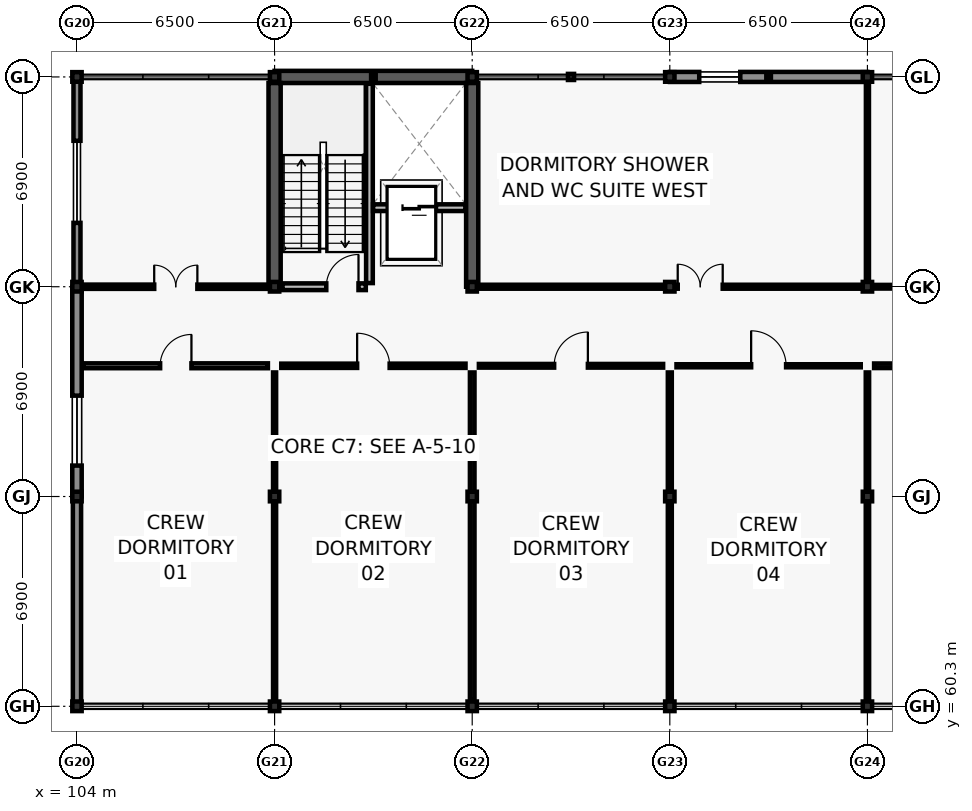
"""IFC4 building model, lengths in metres.
Left out: names, types, materials, properties, quantities, classifications, styles, units other than length and angle.
Written with IfcOpenShell. Run it as: python <this file> out.ifc"""

import sys

from ifc_helpers import new_model, si_unit, direction, frame, frame_2d, origin, origin_2d, place, context, subcontext, project, spatial, rectangle, hollow_rectangle, i_section, extrude, element, fill, save


model = new_model("IFC4")
c1 = context("Model", 3, precision=1e-05, world=origin(), true_north=direction((0.0, 1.0)))
c2 = subcontext(c1, "Body", "Model", "MODEL_VIEW")
j1 = project(units=[si_unit("LENGTHUNIT", "METRE"), si_unit("PLANEANGLEUNIT", "RADIAN")], contexts=[c1])
p1 = place(None, origin())
s1 = spatial("IfcSite", under=j1, at=p1, CompositionType="ELEMENT")
p2 = place(p1, origin())
s2 = spatial("IfcBuilding", under=s1, at=p2, CompositionType="ELEMENT")
p3 = place(p2, frame((0.0, 0.0, 9.6)))
s3 = spatial("IfcBuildingStorey", under=s2, at=p3, CompositionType="ELEMENT", Elevation=9.6)
for number, where, z_axis, x_axis in (
    (1, (104.0, 60.3, 0.0), (0.0, 0.0, 1.0), (1.0, 0.0, 0.0)),
    (2, (104.0, 67.2, 0.0), (0.0, 0.0, 1.0), (1.0, 0.0, 0.0)),
    (3, (104.0, 74.1, 0.0), (0.0, 0.0, 1.0), (1.0, 0.0, 0.0)),
    (4, (104.0, 81.0, 0.0), (0.0, 0.0, 1.0), (1.0, 0.0, 0.0)),
    (5, (110.5, 60.3, 0.0), (0.0, 0.0, 1.0), (1.0, 0.0, 0.0)),
    (6, (110.5, 67.2, 0.0), (0.0, 0.0, 1.0), (1.0, 0.0, 0.0)),
    (7, (110.5, 74.1, 0.0), (0.0, 0.0, 1.0), (1.0, 0.0, 0.0)),
    (8, (110.5, 81.0, 0.0), (0.0, 0.0, 1.0), (1.0, 0.0, 0.0)),
    (9, (117.0, 60.3, 0.0), (0.0, 0.0, 1.0), (1.0, 0.0, 0.0)),
    (10, (117.0, 67.2, 0.0), (0.0, 0.0, 1.0), (1.0, 0.0, 0.0)),
    (11, (117.0, 74.1, 0.0), (0.0, 0.0, 1.0), (1.0, 0.0, 0.0)),
    (12, (117.0, 81.0, 0.0), (0.0, 0.0, 1.0), (1.0, 0.0, 0.0)),
    (13, (123.5, 60.3, 0.0), (0.0, 0.0, 1.0), (1.0, 0.0, 0.0)),
    (14, (123.5, 67.2, 0.0), (0.0, 0.0, 1.0), (1.0, 0.0, 0.0)),
    (15, (123.5, 74.1, 0.0), (0.0, 0.0, 1.0), (1.0, 0.0, 0.0)),
    (16, (123.5, 81.0, 0.0), (0.0, 0.0, 1.0), (1.0, 0.0, 0.0)),
    (17, (130.0, 60.3, 0.0), (0.0, 0.0, 1.0), (1.0, 0.0, 0.0)),
    (18, (130.0, 67.2, 0.0), (0.0, 0.0, 1.0), (1.0, 0.0, 0.0)),
    (19, (130.0, 74.1, 0.0), (0.0, 0.0, 1.0), (1.0, 0.0, 0.0)),
    (20, (130.0, 81.0, 0.0), (0.0, 0.0, 1.0), (1.0, 0.0, 0.0)),
):
    element("IfcColumn", number, at=place(p3, frame(where, z_axis=z_axis, x_axis=x_axis)), inside=s3, PredefinedType="COLUMN", context=c2, shape_type="SweptSolid", body=[
        extrude(i_section(OverallWidth=0.307, OverallDepth=0.315, WebThickness=0.012, FlangeThickness=0.019, FilletRadius=0.017, at=origin_2d()), origin(), (0.0, 0.0, 1.0), 3.9),
    ])
p4 = place(p3, frame((113.75, 81.0, 0.0), z_axis=(0.0, 0.0, 1.0), x_axis=(1.0, 0.0, 0.0)))
e21 = element("IfcColumn", 21, at=p4, inside=s3, PredefinedType="PILASTER", context=c2, shape_type="SweptSolid", body=[
    extrude(hollow_rectangle(XDim=0.15, YDim=0.15, WallThickness=0.009, at=origin_2d()), origin(), (0.0, 0.0, 1.0), 3.9),
])
p5 = place(p3, frame((120.25, 81.0, 0.0), z_axis=(0.0, 0.0, 1.0), x_axis=(1.0, 0.0, 0.0)))
e22 = element("IfcColumn", 22, at=p5, inside=s3, PredefinedType="PILASTER", context=c2, shape_type="SweptSolid", body=[
    extrude(hollow_rectangle(XDim=0.2, YDim=0.2, WallThickness=0.01, at=origin_2d()), origin(), (0.0, 0.0, 1.0), 3.9),
])
p6 = place(p3, frame((126.75, 81.0, 0.0), z_axis=(0.0, 0.0, 1.0), x_axis=(1.0, 0.0, 0.0)))
e23 = element("IfcColumn", 23, at=p6, inside=s3, PredefinedType="PILASTER", context=c2, shape_type="SweptSolid", body=[
    extrude(hollow_rectangle(XDim=0.15, YDim=0.15, WallThickness=0.009, at=origin_2d()), origin(), (0.0, 0.0, 1.0), 3.9),
])
p7 = place(p3, frame((110.5, 81.0, 0.0), z_axis=(0.0, 0.0, 1.0), x_axis=(1.0, 0.0, 0.0)))
e24 = element("IfcWall", 24, at=p7, inside=s3, PredefinedType="SHEAR", context=c2, shape_type="SweptSolid", body=[
    extrude(rectangle(XDim=6.5, YDim=0.4, at=frame_2d((3.25, 0.0))), origin(), (0.0, 0.0, 1.0), 3.66),
])
for number, where, z_axis, x_axis in (
    (25, (110.5, 74.1, 0.0), (0.0, 0.0, 1.0), (0.0, 1.0, 0.0)),
    (26, (117.0, 74.1, 0.0), (0.0, 0.0, 1.0), (0.0, 1.0, 0.0)),
):
    element("IfcWall", number, at=place(p3, frame(where, z_axis=z_axis, x_axis=x_axis)), inside=s3, PredefinedType="SHEAR", context=c2, shape_type="SweptSolid", body=[
        extrude(rectangle(XDim=6.7, YDim=0.4, at=frame_2d((3.35, 0.0))), origin(), (0.0, 0.0, 1.0), 3.66),
    ])
p8 = place(p3, frame((123.505, 81.0, 0.0), z_axis=(0.0, 0.0, 1.0), x_axis=(1.0, 0.0, 0.0)))
e27 = element("IfcWall", 27, at=p8, inside=s3, PredefinedType="SOLIDWALL", context=c2, shape_type="SweptSolid", body=[
    extrude(rectangle(XDim=6.49, YDim=0.33, at=frame_2d((3.245, 0.0))), origin(), (0.0, 0.0, 1.0), 3.02),
])
p9 = place(p8, frame((0.962, 0.0, 0.8)))
e28 = element("IfcOpeningElement", 28, at=p9, cuts=e27, PredefinedType="OPENING", context=c2, shape_type="SweptSolid", body=[
    extrude(rectangle(XDim=1.35, YDim=2.05, at=frame_2d((0.675, 1.025))), frame((0.0, 0.175, 0.0), z_axis=(0.0, -1.0, 0.0), x_axis=(1.0, 0.0, 0.0)), (0.0, 0.0, 1.0), 0.35),
])
p10 = place(p3, frame((104.0, 60.305, 0.0), z_axis=(0.0, 0.0, 1.0), x_axis=(0.0, 1.0, 0.0)))
e29 = element("IfcWall", 29, at=p10, inside=s3, PredefinedType="SOLIDWALL", context=c2, shape_type="SweptSolid", body=[
    extrude(rectangle(XDim=6.89, YDim=0.27, at=frame_2d((3.445, 0.0))), origin(), (0.0, 0.0, 1.0), 3.02),
])
p11 = place(p3, frame((104.0, 67.205, 0.0), z_axis=(0.0, 0.0, 1.0), x_axis=(0.0, 1.0, 0.0)))
e30 = element("IfcWall", 30, at=p11, inside=s3, PredefinedType="SOLIDWALL", context=c2, shape_type="SweptSolid", body=[
    extrude(rectangle(XDim=6.89, YDim=0.31, at=frame_2d((3.445, 0.0))), origin(), (0.0, 0.0, 1.0), 3.02),
])
p12 = place(p11, frame((1.012, 0.0, 0.8)))
e31 = element("IfcOpeningElement", 31, at=p12, cuts=e30, PredefinedType="OPENING", context=c2, shape_type="SweptSolid", body=[
    extrude(rectangle(XDim=2.3, YDim=1.15, at=frame_2d((1.15, 0.575))), frame((0.0, 0.165, 0.0), z_axis=(0.0, -1.0, 0.0), x_axis=(1.0, 0.0, 0.0)), (0.0, 0.0, 1.0), 0.33),
])
p13 = place(p3, frame((104.0, 74.105, 0.0), z_axis=(0.0, 0.0, 1.0), x_axis=(0.0, 1.0, 0.0)))
e32 = element("IfcWall", 32, at=p13, inside=s3, PredefinedType="SOLIDWALL", context=c2, shape_type="SweptSolid", body=[
    extrude(rectangle(XDim=6.89, YDim=0.23, at=frame_2d((3.445, 0.0))), origin(), (0.0, 0.0, 1.0), 3.02),
])
p14 = place(p13, frame((2.095, 0.0, 0.8)))
e33 = element("IfcOpeningElement", 33, at=p14, cuts=e32, PredefinedType="OPENING", context=c2, shape_type="SweptSolid", body=[
    extrude(rectangle(XDim=2.7, YDim=1.15, at=frame_2d((1.35, 0.575))), frame((0.0, 0.125, 0.0), z_axis=(0.0, -1.0, 0.0), x_axis=(1.0, 0.0, 0.0)), (0.0, 0.0, 1.0), 0.25),
])
p15 = place(p3, frame((113.62, 74.22, 0.0), z_axis=(0.0, 0.0, 1.0), x_axis=(0.0, 1.0, 0.0)))
e34 = element("IfcWall", 34, at=p15, inside=s3, PredefinedType="SOLIDWALL", context=c2, shape_type="SweptSolid", body=[
    extrude(rectangle(XDim=6.555, YDim=0.22, at=frame_2d((3.277, 0.0))), origin(), (0.0, 0.0, 1.0), 3.66),
])
p16 = place(p3, frame((110.76, 74.1, 0.0), z_axis=(0.0, 0.0, 1.0), x_axis=(1.0, 0.0, 0.0)))
e35 = element("IfcWall", 35, at=p16, inside=s3, PredefinedType="SOLIDWALL", context=c2, shape_type="SweptSolid", body=[
    extrude(rectangle(XDim=2.74, YDim=0.22, at=frame_2d((1.37, 0.0))), origin(), (0.0, 0.0, 1.0), 3.02),
])
p17 = place(p16, frame((1.44, 0.0, 0.0)))
e36 = element("IfcOpeningElement", 36, at=p17, cuts=e35, PredefinedType="OPENING", context=c2, shape_type="SweptSolid", body=[
    extrude(rectangle(XDim=1.06, YDim=2.1, at=frame_2d((0.53, 1.05))), frame((0.0, 0.12, 0.0), z_axis=(0.0, -1.0, 0.0), x_axis=(1.0, 0.0, 0.0)), (0.0, 0.0, 1.0), 0.24),
])
p18 = place(p3, frame((113.74, 76.7, 0.0), z_axis=(0.0, 0.0, 1.0), x_axis=(1.0, 0.0, 0.0)))
e37 = element("IfcWall", 37, at=p18, inside=s3, PredefinedType="SOLIDWALL", context=c2, shape_type="SweptSolid", body=[
    extrude(rectangle(XDim=3.035, YDim=0.22, at=frame_2d((1.518, 0.0))), origin(), (0.0, 0.0, 1.0), 3.66),
])
p19 = place(p18, frame((0.968, 0.0, 0.0)))
e38 = element("IfcOpeningElement", 38, at=p19, cuts=e37, PredefinedType="OPENING", context=c2, shape_type="SweptSolid", body=[
    extrude(rectangle(XDim=1.1, YDim=2.1, at=frame_2d((0.55, 1.05))), frame((0.0, 0.12, 0.0), z_axis=(0.0, -1.0, 0.0), x_axis=(1.0, 0.0, 0.0)), (0.0, 0.0, 1.0), 0.24),
])
p20 = place(p3, frame((110.5, 60.52, 0.0), z_axis=(0.0, 0.0, 1.0), x_axis=(0.0, 1.0, 0.0)))
e39 = element("IfcWall", 39, at=p20, inside=s3, PredefinedType="PARTITIONING", context=c2, shape_type="SweptSolid", body=[
    extrude(rectangle(XDim=10.76, YDim=0.1, at=frame_2d((5.38, 0.0))), origin(), (0.0, 0.0, 1.0), 3.0),
])
p21 = place(p3, frame((104.22, 71.5, 0.0), z_axis=(0.0, 0.0, 1.0), x_axis=(1.0, 0.0, 0.0)))
e40 = element("IfcWall", 40, at=p21, inside=s3, PredefinedType="PARTITIONING", context=c2, shape_type="SweptSolid", body=[
    extrude(rectangle(XDim=6.06, YDim=0.16, at=frame_2d((3.03, 0.0))), origin(), (0.0, 0.0, 1.0), 3.0),
])
p22 = place(p21, frame((2.515, 0.0, 0.0)))
e41 = element("IfcOpeningElement", 41, at=p22, cuts=e40, PredefinedType="OPENING", context=c2, shape_type="SweptSolid", body=[
    extrude(rectangle(XDim=1.03, YDim=2.06, at=frame_2d((0.515, 1.03))), frame((0.0, 0.09, 0.0), z_axis=(0.0, -1.0, 0.0), x_axis=(1.0, 0.0, 0.0)), (0.0, 0.0, 1.0), 0.18),
])
p23 = place(p3, frame((117.0, 60.52, 0.0), z_axis=(0.0, 0.0, 1.0), x_axis=(0.0, 1.0, 0.0)))
e42 = element("IfcWall", 42, at=p23, inside=s3, PredefinedType="PARTITIONING", context=c2, shape_type="SweptSolid", body=[
    extrude(rectangle(XDim=10.76, YDim=0.15, at=frame_2d((5.38, 0.0))), origin(), (0.0, 0.0, 1.0), 3.0),
])
p24 = place(p3, frame((110.72, 71.5, 0.0), z_axis=(0.0, 0.0, 1.0), x_axis=(1.0, 0.0, 0.0)))
e43 = element("IfcWall", 43, at=p24, inside=s3, PredefinedType="PARTITIONING", context=c2, shape_type="SweptSolid", body=[
    extrude(rectangle(XDim=6.06, YDim=0.14, at=frame_2d((3.03, 0.0))), origin(), (0.0, 0.0, 1.0), 3.0),
])
p25 = place(p24, frame((2.495, 0.0, 0.0)))
e44 = element("IfcOpeningElement", 44, at=p25, cuts=e43, PredefinedType="OPENING", context=c2, shape_type="SweptSolid", body=[
    extrude(rectangle(XDim=1.07, YDim=2.08, at=frame_2d((0.535, 1.04))), frame((0.0, 0.08, 0.0), z_axis=(0.0, -1.0, 0.0), x_axis=(1.0, 0.0, 0.0)), (0.0, 0.0, 1.0), 0.16),
])
p26 = place(p3, frame((123.5, 60.52, 0.0), z_axis=(0.0, 0.0, 1.0), x_axis=(0.0, 1.0, 0.0)))
e45 = element("IfcWall", 45, at=p26, inside=s3, PredefinedType="PARTITIONING", context=c2, shape_type="SweptSolid", body=[
    extrude(rectangle(XDim=10.76, YDim=0.13, at=frame_2d((5.38, 0.0))), origin(), (0.0, 0.0, 1.0), 3.0),
])
p27 = place(p3, frame((117.22, 71.5, 0.0), z_axis=(0.0, 0.0, 1.0), x_axis=(1.0, 0.0, 0.0)))
e46 = element("IfcWall", 46, at=p27, inside=s3, PredefinedType="PARTITIONING", context=c2, shape_type="SweptSolid", body=[
    extrude(rectangle(XDim=6.06, YDim=0.12, at=frame_2d((3.03, 0.0))), origin(), (0.0, 0.0, 1.0), 3.0),
])
p28 = place(p27, frame((2.475, 0.0, 0.0)))
e47 = element("IfcOpeningElement", 47, at=p28, cuts=e46, PredefinedType="OPENING", context=c2, shape_type="SweptSolid", body=[
    extrude(rectangle(XDim=1.11, YDim=2.1, at=frame_2d((0.555, 1.05))), frame((0.0, 0.07, 0.0), z_axis=(0.0, -1.0, 0.0), x_axis=(1.0, 0.0, 0.0)), (0.0, 0.0, 1.0), 0.14),
])
p29 = place(p3, frame((130.0, 60.52, 0.0), z_axis=(0.0, 0.0, 1.0), x_axis=(0.0, 1.0, 0.0)))
e48 = element("IfcWall", 48, at=p29, inside=s3, PredefinedType="PARTITIONING", context=c2, shape_type="SweptSolid", body=[
    extrude(rectangle(XDim=10.76, YDim=0.11, at=frame_2d((5.38, 0.0))), origin(), (0.0, 0.0, 1.0), 3.0),
])
p30 = place(p3, frame((123.72, 71.5, 0.0), z_axis=(0.0, 0.0, 1.0), x_axis=(1.0, 0.0, 0.0)))
e49 = element("IfcWall", 49, at=p30, inside=s3, PredefinedType="PARTITIONING", context=c2, shape_type="SweptSolid", body=[
    extrude(rectangle(XDim=6.06, YDim=0.1, at=frame_2d((3.03, 0.0))), origin(), (0.0, 0.0, 1.0), 3.0),
])
p31 = place(p30, frame((2.455, 0.0, 0.0)))
e50 = element("IfcOpeningElement", 50, at=p31, cuts=e49, PredefinedType="OPENING", context=c2, shape_type="SweptSolid", body=[
    extrude(rectangle(XDim=1.15, YDim=2.12, at=frame_2d((0.575, 1.06))), frame((0.0, 0.06, 0.0), z_axis=(0.0, -1.0, 0.0), x_axis=(1.0, 0.0, 0.0)), (0.0, 0.0, 1.0), 0.12),
])
p32 = place(p3, frame((130.22, 71.5, 0.0), z_axis=(0.0, 0.0, 1.0), x_axis=(1.0, 0.0, 0.0)))
e51 = element("IfcWall", 51, at=p32, inside=s3, PredefinedType="PARTITIONING", context=c2, shape_type="SweptSolid", body=[
    extrude(rectangle(XDim=6.06, YDim=0.15, at=frame_2d((3.03, 0.0))), origin(), (0.0, 0.0, 1.0), 3.0),
])
p33 = place(p32, frame((2.435, 0.0, 0.0)))
e52 = element("IfcOpeningElement", 52, at=p33, cuts=e51, PredefinedType="OPENING", context=c2, shape_type="SweptSolid", body=[
    extrude(rectangle(XDim=1.19, YDim=2.14, at=frame_2d((0.595, 1.07))), frame((0.0, 0.085, 0.0), z_axis=(0.0, -1.0, 0.0), x_axis=(1.0, 0.0, 0.0)), (0.0, 0.0, 1.0), 0.17),
])
p34 = place(p3, frame((104.22, 74.1, 0.0), z_axis=(0.0, 0.0, 1.0), x_axis=(1.0, 0.0, 0.0)))
e53 = element("IfcWall", 53, at=p34, inside=s3, PredefinedType="PARTITIONING", context=c2, shape_type="SweptSolid", body=[
    extrude(rectangle(XDim=6.06, YDim=0.14, at=frame_2d((3.03, 0.0))), origin(), (0.0, 0.0, 1.0), 3.0),
])
p35 = place(p34, frame((2.32, 0.0, 0.0)))
e54 = element("IfcOpeningElement", 54, at=p35, cuts=e53, PredefinedType="OPENING", context=c2, shape_type="SweptSolid", body=[
    extrude(rectangle(XDim=1.42, YDim=2.15, at=frame_2d((0.71, 1.075))), frame((0.0, 0.08, 0.0), z_axis=(0.0, -1.0, 0.0), x_axis=(1.0, 0.0, 0.0)), (0.0, 0.0, 1.0), 0.16),
])
p36 = place(p3, frame((117.22, 74.1, 0.0), z_axis=(0.0, 0.0, 1.0), x_axis=(1.0, 0.0, 0.0)))
e55 = element("IfcWall", 55, at=p36, inside=s3, PredefinedType="PARTITIONING", context=c2, shape_type="SweptSolid", body=[
    extrude(rectangle(XDim=12.56, YDim=0.13, at=frame_2d((6.28, 0.0))), origin(), (0.0, 0.0, 1.0), 3.0),
])
p37 = place(p36, frame((6.54, 0.0, 0.0)))
e56 = element("IfcOpeningElement", 56, at=p37, cuts=e55, PredefinedType="OPENING", context=c2, shape_type="SweptSolid", body=[
    extrude(rectangle(XDim=1.48, YDim=2.18, at=frame_2d((0.74, 1.09))), frame((0.0, 0.075, 0.0), z_axis=(0.0, -1.0, 0.0), x_axis=(1.0, 0.0, 0.0)), (0.0, 0.0, 1.0), 0.15),
])
p38 = place(p3, frame((130.22, 74.1, 0.0), z_axis=(0.0, 0.0, 1.0), x_axis=(1.0, 0.0, 0.0)))
e57 = element("IfcWall", 57, at=p38, inside=s3, PredefinedType="PARTITIONING", context=c2, shape_type="SweptSolid", body=[
    extrude(rectangle(XDim=12.56, YDim=0.12, at=frame_2d((6.28, 0.0))), origin(), (0.0, 0.0, 1.0), 3.0),
])
p39 = place(p38, frame((6.75, 0.0, 0.0)))
e58 = element("IfcOpeningElement", 58, at=p39, cuts=e57, PredefinedType="OPENING", context=c2, shape_type="SweptSolid", body=[
    extrude(rectangle(XDim=1.56, YDim=2.18, at=frame_2d((0.78, 1.09))), frame((0.0, 0.07, 0.0), z_axis=(0.0, -1.0, 0.0), x_axis=(1.0, 0.0, 0.0)), (0.0, 0.0, 1.0), 0.14),
])
p40 = place(p3, frame((130.0, 74.32, 0.0), z_axis=(0.0, 0.0, 1.0), x_axis=(0.0, 1.0, 0.0)))
e59 = element("IfcWall", 59, at=p40, inside=s3, PredefinedType="PARTITIONING", context=c2, shape_type="SweptSolid", body=[
    extrude(rectangle(XDim=6.46, YDim=0.1, at=frame_2d((3.23, 0.0))), origin(), (0.0, 0.0, 1.0), 3.0),
])
p41 = place(p9, origin())
e60 = element("IfcWindow", 60, at=p41, inside=s3, PartitioningType="SINGLE_PANEL", PredefinedType="WINDOW", context=c2, shape_type="SweptSolid", body=[
    extrude(rectangle(XDim=1.35, YDim=2.05, at=frame_2d((0.675, 1.025))), frame((0.0, 0.03, 0.0), z_axis=(0.0, -1.0, 0.0), x_axis=(1.0, 0.0, 0.0)), (0.0, 0.0, 1.0), 0.06),
])
fill(e28, e60)
p42 = place(p12, origin())
e61 = element("IfcWindow", 61, at=p42, inside=s3, PartitioningType="DOUBLE_PANEL_VERTICAL", PredefinedType="WINDOW", context=c2, shape_type="SweptSolid", body=[
    extrude(rectangle(XDim=2.3, YDim=1.15, at=frame_2d((1.15, 0.575))), frame((0.0, 0.03, 0.0), z_axis=(0.0, -1.0, 0.0), x_axis=(1.0, 0.0, 0.0)), (0.0, 0.0, 1.0), 0.06),
])
fill(e31, e61)
p43 = place(p14, origin())
e62 = element("IfcWindow", 62, at=p43, inside=s3, PartitioningType="TRIPLE_PANEL_VERTICAL", PredefinedType="WINDOW", context=c2, shape_type="SweptSolid", body=[
    extrude(rectangle(XDim=2.7, YDim=1.15, at=frame_2d((1.35, 0.575))), frame((0.0, 0.03, 0.0), z_axis=(0.0, -1.0, 0.0), x_axis=(1.0, 0.0, 0.0)), (0.0, 0.0, 1.0), 0.06),
])
fill(e33, e62)
p44 = place(p17, origin())
e63 = element("IfcDoor", 63, at=p44, inside=s3, OperationType="SINGLE_SWING_RIGHT", PredefinedType="DOOR", context=c2, shape_type="SweptSolid", body=[
    extrude(rectangle(XDim=1.06, YDim=2.1, at=frame_2d((0.53, 1.05))), frame((0.0, 0.025, 0.0), z_axis=(0.0, -1.0, 0.0), x_axis=(1.0, 0.0, 0.0)), (0.0, 0.0, 1.0), 0.05),
])
fill(e36, e63)
p45 = place(p19, origin())
e64 = element("IfcDoor", 64, at=p45, inside=s3, OperationType="DOUBLE_DOOR_SLIDING", PredefinedType="DOOR", context=c2, shape_type="SweptSolid", body=[
    extrude(rectangle(XDim=1.1, YDim=2.1, at=frame_2d((0.55, 1.05))), frame((0.0, 0.025, 0.0), z_axis=(0.0, -1.0, 0.0), x_axis=(1.0, 0.0, 0.0)), (0.0, 0.0, 1.0), 0.05),
])
fill(e38, e64)
p46 = place(p22, origin())
e65 = element("IfcDoor", 65, at=p46, inside=s3, OperationType="SINGLE_SWING_RIGHT", PredefinedType="DOOR", context=c2, shape_type="SweptSolid", body=[
    extrude(rectangle(XDim=1.03, YDim=2.06, at=frame_2d((0.515, 1.03))), frame((0.0, 0.025, 0.0), z_axis=(0.0, -1.0, 0.0), x_axis=(1.0, 0.0, 0.0)), (0.0, 0.0, 1.0), 0.05),
])
fill(e41, e65)
p47 = place(p25, origin())
e66 = element("IfcDoor", 66, at=p47, inside=s3, OperationType="SINGLE_SWING_LEFT", PredefinedType="DOOR", context=c2, shape_type="SweptSolid", body=[
    extrude(rectangle(XDim=1.07, YDim=2.08, at=frame_2d((0.535, 1.04))), frame((0.0, 0.025, 0.0), z_axis=(0.0, -1.0, 0.0), x_axis=(1.0, 0.0, 0.0)), (0.0, 0.0, 1.0), 0.05),
])
fill(e44, e66)
p48 = place(p28, origin())
e67 = element("IfcDoor", 67, at=p48, inside=s3, OperationType="SINGLE_SWING_RIGHT", PredefinedType="DOOR", context=c2, shape_type="SweptSolid", body=[
    extrude(rectangle(XDim=1.11, YDim=2.1, at=frame_2d((0.555, 1.05))), frame((0.0, 0.025, 0.0), z_axis=(0.0, -1.0, 0.0), x_axis=(1.0, 0.0, 0.0)), (0.0, 0.0, 1.0), 0.05),
])
fill(e47, e67)
p49 = place(p31, origin())
e68 = element("IfcDoor", 68, at=p49, inside=s3, OperationType="SINGLE_SWING_LEFT", PredefinedType="DOOR", context=c2, shape_type="SweptSolid", body=[
    extrude(rectangle(XDim=1.15, YDim=2.12, at=frame_2d((0.575, 1.06))), frame((0.0, 0.025, 0.0), z_axis=(0.0, -1.0, 0.0), x_axis=(1.0, 0.0, 0.0)), (0.0, 0.0, 1.0), 0.05),
])
fill(e50, e68)
p50 = place(p35, origin())
e69 = element("IfcDoor", 69, at=p50, inside=s3, OperationType="DOUBLE_DOOR_SINGLE_SWING", PredefinedType="DOOR", context=c2, shape_type="SweptSolid", body=[
    extrude(rectangle(XDim=1.42, YDim=2.15, at=frame_2d((0.71, 1.075))), frame((0.0, 0.025, 0.0), z_axis=(0.0, -1.0, 0.0), x_axis=(1.0, 0.0, 0.0)), (0.0, 0.0, 1.0), 0.05),
])
fill(e54, e69)
p51 = place(p37, origin())
e70 = element("IfcDoor", 70, at=p51, inside=s3, OperationType="DOUBLE_DOOR_SINGLE_SWING", PredefinedType="DOOR", context=c2, shape_type="SweptSolid", body=[
    extrude(rectangle(XDim=1.48, YDim=2.18, at=frame_2d((0.74, 1.09))), frame((0.0, 0.025, 0.0), z_axis=(0.0, -1.0, 0.0), x_axis=(1.0, 0.0, 0.0)), (0.0, 0.0, 1.0), 0.05),
])
fill(e56, e70)
save(model, sys.argv[1])
